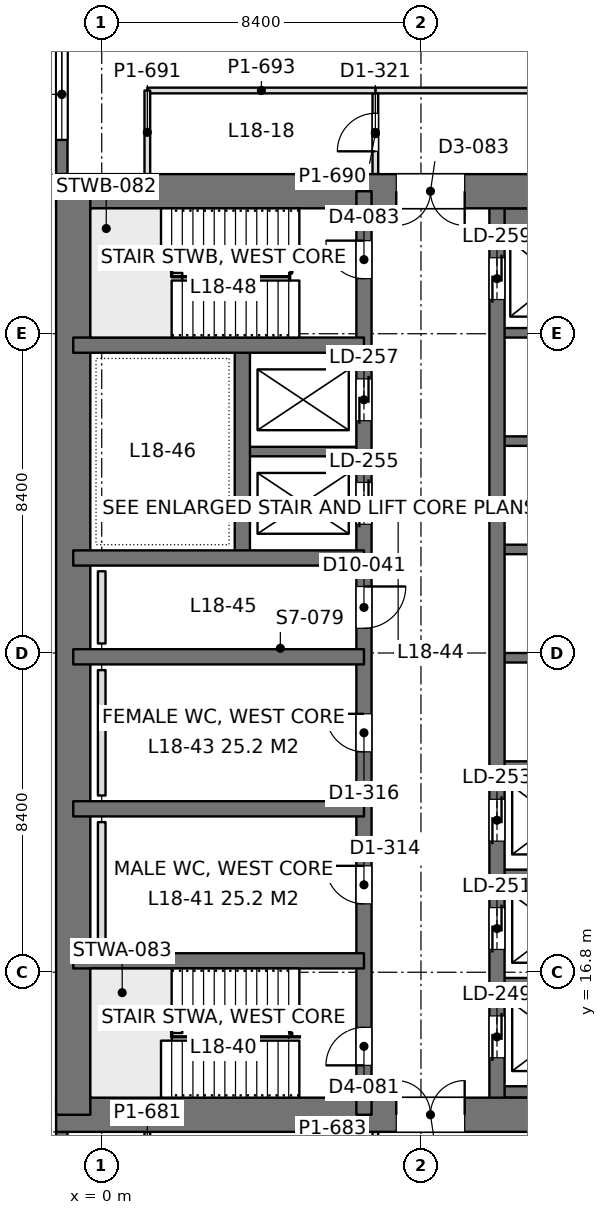
"""IFC4 building model, lengths in metres.
Left out: names, types, materials, properties, quantities, classifications, styles, units other than length and angle.
Written with IfcOpenShell. Run it as: python <this file> out.ifc"""

import sys

from ifc_helpers import new_model, si_unit, direction, frame, frame_2d, origin, place, context, subcontext, project, spatial, rectangle, extrude, element, fill, save


model = new_model("IFC4")
c1 = context("Model", 3, precision=1e-05, world=origin(), true_north=direction((0.0, 1.0)))
c2 = subcontext(c1, "Body", "Model", "MODEL_VIEW")
j1 = project(units=[si_unit("LENGTHUNIT", "METRE"), si_unit("PLANEANGLEUNIT", "RADIAN")], contexts=[c1])
p1 = place(None, origin())
s1 = spatial("IfcSite", under=j1, at=p1, CompositionType="ELEMENT")
p2 = place(p1, origin())
s2 = spatial("IfcBuilding", under=s1, at=p2, CompositionType="ELEMENT")
p3 = place(p2, frame((0.0, 0.0, 81.9)))
s3 = spatial("IfcBuildingStorey", under=s2, at=p3, CompositionType="ELEMENT", Elevation=81.9)
p4 = place(p3, frame((-1.2, 13.05, 0.0), z_axis=(0.0, 0.0, 1.0), x_axis=(1.0, 0.0, 0.0)))
e1 = element("IfcWall", 1, at=p4, inside=s3, PredefinedType="SHEAR", context=c2, shape_type="SweptSolid", body=[
    extrude(rectangle(XDim=18.0, YDim=0.9, at=frame_2d((9.0, 0.0))), origin(), (0.0, 0.0, 1.0), 4.5),
])
p5 = place(p4, frame((8.95, 0.0, 0.0)))
e2 = element("IfcOpeningElement", 2, at=p5, cuts=e1, PredefinedType="OPENING", context=c2, shape_type="SweptSolid", body=[
    extrude(rectangle(XDim=1.8, YDim=2.4, at=frame_2d((0.9, 1.2))), frame((0.0, 0.46, 0.0), z_axis=(0.0, -1.0, 0.0), x_axis=(1.0, 0.0, 0.0)), (0.0, 0.0, 1.0), 0.92),
])
p6 = place(p3, frame((-1.2, 37.35, 0.0), z_axis=(0.0, 0.0, 1.0), x_axis=(1.0, 0.0, 0.0)))
e3 = element("IfcWall", 3, at=p6, inside=s3, PredefinedType="SHEAR", context=c2, shape_type="SweptSolid", body=[
    extrude(rectangle(XDim=18.0, YDim=0.9, at=frame_2d((9.0, 0.0))), origin(), (0.0, 0.0, 1.0), 4.5),
])
p7 = place(p6, frame((8.95, 0.0, 0.0)))
e4 = element("IfcOpeningElement", 4, at=p7, cuts=e3, PredefinedType="OPENING", context=c2, shape_type="SweptSolid", body=[
    extrude(rectangle(XDim=1.8, YDim=2.4, at=frame_2d((0.9, 1.2))), frame((0.0, 0.46, 0.0), z_axis=(0.0, -1.0, 0.0), x_axis=(1.0, 0.0, 0.0)), (0.0, 0.0, 1.0), 0.92),
])
p8 = place(p3, frame((-0.75, 13.05, 0.0), z_axis=(0.0, 0.0, 1.0), x_axis=(0.0, 1.0, 0.0)))
e5 = element("IfcWall", 5, at=p8, inside=s3, PredefinedType="SHEAR", context=c2, shape_type="SweptSolid", body=[
    extrude(rectangle(XDim=24.3, YDim=0.9, at=frame_2d((12.15, 0.0))), origin(), (0.0, 0.0, 1.0), 4.5),
])
p9 = place(p3, frame((6.9, 13.05, 0.0), z_axis=(0.0, 0.0, 1.0), x_axis=(0.0, 1.0, 0.0)))
e6 = element("IfcWall", 6, at=p9, inside=s3, PredefinedType="SHEAR", context=c2, shape_type="SweptSolid", body=[
    extrude(rectangle(XDim=24.3, YDim=0.4, at=frame_2d((12.15, 0.0))), origin(), (0.0, 0.0, 1.0), 4.5),
])
p10 = place(p9, frame((1.3, 0.0, 0.0)))
e7 = element("IfcOpeningElement", 7, at=p10, cuts=e6, PredefinedType="OPENING", context=c2, shape_type="SweptSolid", body=[
    extrude(rectangle(XDim=1.0, YDim=2.2, at=frame_2d((0.5, 1.1))), frame((0.0, 0.21, 0.0), z_axis=(0.0, -1.0, 0.0), x_axis=(1.0, 0.0, 0.0)), (0.0, 0.0, 1.0), 0.42),
])
p11 = place(p9, frame((22.0, 0.0, 0.0)))
e8 = element("IfcOpeningElement", 8, at=p11, cuts=e6, PredefinedType="OPENING", context=c2, shape_type="SweptSolid", body=[
    extrude(rectangle(XDim=1.0, YDim=2.2, at=frame_2d((0.5, 1.1))), frame((0.0, 0.21, 0.0), z_axis=(0.0, -1.0, 0.0), x_axis=(1.0, 0.0, 0.0)), (0.0, 0.0, 1.0), 0.42),
])
p12 = place(p9, frame((5.55, 0.0, 0.0)))
e9 = element("IfcOpeningElement", 9, at=p12, cuts=e6, PredefinedType="OPENING", context=c2, shape_type="SweptSolid", body=[
    extrude(rectangle(XDim=1.0, YDim=2.2, at=frame_2d((0.5, 1.1))), frame((0.0, 0.21, 0.0), z_axis=(0.0, -1.0, 0.0), x_axis=(1.0, 0.0, 0.0)), (0.0, 0.0, 1.0), 0.42),
])
p13 = place(p9, frame((9.55, 0.0, 0.0)))
e10 = element("IfcOpeningElement", 10, at=p13, cuts=e6, PredefinedType="OPENING", context=c2, shape_type="SweptSolid", body=[
    extrude(rectangle(XDim=1.0, YDim=2.2, at=frame_2d((0.5, 1.1))), frame((0.0, 0.21, 0.0), z_axis=(0.0, -1.0, 0.0), x_axis=(1.0, 0.0, 0.0)), (0.0, 0.0, 1.0), 0.42),
])
p14 = place(p9, frame((12.8, 0.0, 0.0)))
e11 = element("IfcOpeningElement", 11, at=p14, cuts=e6, PredefinedType="OPENING", context=c2, shape_type="SweptSolid", body=[
    extrude(rectangle(XDim=1.1, YDim=2.2, at=frame_2d((0.55, 1.1))), frame((0.0, 0.21, 0.0), z_axis=(0.0, -1.0, 0.0), x_axis=(1.0, 0.0, 0.0)), (0.0, 0.0, 1.0), 0.42),
])
p15 = place(p9, frame((15.538, 0.0, 0.0)))
e12 = element("IfcOpeningElement", 12, at=p15, cuts=e6, PredefinedType="OPENING", context=c2, shape_type="SweptSolid", body=[
    extrude(rectangle(XDim=1.1, YDim=2.2, at=frame_2d((0.55, 1.1))), frame((0.0, 0.21, 0.0), z_axis=(0.0, -1.0, 0.0), x_axis=(1.0, 0.0, 0.0)), (0.0, 0.0, 1.0), 0.42),
])
p16 = place(p9, frame((18.262, 0.0, 0.0)))
e13 = element("IfcOpeningElement", 13, at=p16, cuts=e6, PredefinedType="OPENING", context=c2, shape_type="SweptSolid", body=[
    extrude(rectangle(XDim=1.1, YDim=2.2, at=frame_2d((0.55, 1.1))), frame((0.0, 0.21, 0.0), z_axis=(0.0, -1.0, 0.0), x_axis=(1.0, 0.0, 0.0)), (0.0, 0.0, 1.0), 0.42),
])
p17 = place(p3, frame((10.4, 13.05, 0.0), z_axis=(0.0, 0.0, 1.0), x_axis=(0.0, 1.0, 0.0)))
e14 = element("IfcWall", 14, at=p17, inside=s3, PredefinedType="SHEAR", context=c2, shape_type="SweptSolid", body=[
    extrude(rectangle(XDim=24.3, YDim=0.4, at=frame_2d((12.15, 0.0))), origin(), (0.0, 0.0, 1.0), 4.5),
])
p18 = place(p17, frame((1.5, 0.0, 0.0)))
e15 = element("IfcOpeningElement", 15, at=p18, cuts=e14, PredefinedType="OPENING", context=c2, shape_type="SweptSolid", body=[
    extrude(rectangle(XDim=1.1, YDim=2.2, at=frame_2d((0.55, 1.1))), frame((0.0, 0.21, 0.0), z_axis=(0.0, -1.0, 0.0), x_axis=(1.0, 0.0, 0.0)), (0.0, 0.0, 1.0), 0.42),
])
p19 = place(p17, frame((4.35, 0.0, 0.0)))
e16 = element("IfcOpeningElement", 16, at=p19, cuts=e14, PredefinedType="OPENING", context=c2, shape_type="SweptSolid", body=[
    extrude(rectangle(XDim=1.1, YDim=2.2, at=frame_2d((0.55, 1.1))), frame((0.0, 0.21, 0.0), z_axis=(0.0, -1.0, 0.0), x_axis=(1.0, 0.0, 0.0)), (0.0, 0.0, 1.0), 0.42),
])
p20 = place(p17, frame((7.2, 0.0, 0.0)))
e17 = element("IfcOpeningElement", 17, at=p20, cuts=e14, PredefinedType="OPENING", context=c2, shape_type="SweptSolid", body=[
    extrude(rectangle(XDim=1.1, YDim=2.2, at=frame_2d((0.55, 1.1))), frame((0.0, 0.21, 0.0), z_axis=(0.0, -1.0, 0.0), x_axis=(1.0, 0.0, 0.0)), (0.0, 0.0, 1.0), 0.42),
])
p21 = place(p17, frame((21.45, 0.0, 0.0)))
e18 = element("IfcOpeningElement", 18, at=p21, cuts=e14, PredefinedType="OPENING", context=c2, shape_type="SweptSolid", body=[
    extrude(rectangle(XDim=1.1, YDim=2.2, at=frame_2d((0.55, 1.1))), frame((0.0, 0.21, 0.0), z_axis=(0.0, -1.0, 0.0), x_axis=(1.0, 0.0, 0.0)), (0.0, 0.0, 1.0), 0.42),
])
for number, where, z_axis, x_axis in (
    (19, (-0.75, 17.1, 0.0), (0.0, 0.0, 1.0), (1.0, 0.0, 0.0)),
    (20, (-0.75, 21.1, 0.0), (0.0, 0.0, 1.0), (1.0, 0.0, 0.0)),
    (21, (-0.75, 25.1, 0.0), (0.0, 0.0, 1.0), (1.0, 0.0, 0.0)),
    (22, (-0.75, 27.7, 0.0), (0.0, 0.0, 1.0), (1.0, 0.0, 0.0)),
    (23, (-0.75, 33.3, 0.0), (0.0, 0.0, 1.0), (1.0, 0.0, 0.0)),
):
    element("IfcWall", number, at=place(p3, frame(where, z_axis=z_axis, x_axis=x_axis)), inside=s3, PredefinedType="SHEAR", context=c2, shape_type="SweptSolid", body=[
        extrude(rectangle(XDim=7.65, YDim=0.4, at=frame_2d((3.825, 0.0))), origin(), (0.0, 0.0, 1.0), 4.5),
    ])
p22 = place(p3, frame((3.7, 27.7, 0.0), z_axis=(0.0, 0.0, 1.0), x_axis=(0.0, 1.0, 0.0)))
e24 = element("IfcWall", 24, at=p22, inside=s3, PredefinedType="SHEAR", context=c2, shape_type="SweptSolid", body=[
    extrude(rectangle(XDim=5.6, YDim=0.4, at=frame_2d((2.8, 0.0))), origin(), (0.0, 0.0, 1.0), 4.5),
])
p23 = place(p3, frame((3.7, 30.5, 0.0), z_axis=(0.0, 0.0, 1.0), x_axis=(1.0, 0.0, 0.0)))
e25 = element("IfcWall", 25, at=p23, inside=s3, PredefinedType="SHEAR", context=c2, shape_type="SweptSolid", body=[
    extrude(rectangle(XDim=3.2, YDim=0.25, at=frame_2d((1.6, 0.0))), origin(), (0.0, 0.0, 1.0), 4.5),
])
p24 = place(p3, frame((10.4, 13.65, 0.0), z_axis=(0.0, 0.0, 1.0), x_axis=(1.0, 0.0, 0.0)))
e26 = element("IfcWall", 26, at=p24, inside=s3, PredefinedType="SHEAR", context=c2, shape_type="SweptSolid", body=[
    extrude(rectangle(XDim=3.2, YDim=0.3, at=frame_2d((1.6, 0.0))), origin(), (0.0, 0.0, 1.0), 4.5),
])
for number, where, z_axis, x_axis in (
    (27, (10.4, 16.525, 0.0), (0.0, 0.0, 1.0), (1.0, 0.0, 0.0)),
    (28, (10.4, 19.375, 0.0), (0.0, 0.0, 1.0), (1.0, 0.0, 0.0)),
    (29, (10.4, 22.225, 0.0), (0.0, 0.0, 1.0), (1.0, 0.0, 0.0)),
    (30, (10.4, 25.075, 0.0), (0.0, 0.0, 1.0), (1.0, 0.0, 0.0)),
    (31, (10.4, 27.925, 0.0), (0.0, 0.0, 1.0), (1.0, 0.0, 0.0)),
    (32, (10.4, 30.775, 0.0), (0.0, 0.0, 1.0), (1.0, 0.0, 0.0)),
    (33, (10.4, 33.625, 0.0), (0.0, 0.0, 1.0), (1.0, 0.0, 0.0)),
):
    element("IfcWall", number, at=place(p3, frame(where, z_axis=z_axis, x_axis=x_axis)), inside=s3, PredefinedType="SHEAR", context=c2, shape_type="SweptSolid", body=[
        extrude(rectangle(XDim=3.2, YDim=0.25, at=frame_2d((1.6, 0.0))), origin(), (0.0, 0.0, 1.0), 4.5),
    ])
p25 = place(p3, frame((10.4, 36.625, 0.0), z_axis=(0.0, 0.0, 1.0), x_axis=(1.0, 0.0, 0.0)))
e34 = element("IfcWall", 34, at=p25, inside=s3, PredefinedType="SHEAR", context=c2, shape_type="SweptSolid", body=[
    extrude(rectangle(XDim=3.2, YDim=0.55, at=frame_2d((1.6, 0.0))), origin(), (0.0, 0.0, 1.0), 4.5),
])
p26 = place(p3, frame((-1.05, 8.4, 0.0), z_axis=(0.0, 0.0, 1.0), x_axis=(0.0, 1.0, 0.0)))
e35 = element("IfcWall", 35, at=p26, inside=s3, PredefinedType="SOLIDWALL", context=c2, shape_type="SweptSolid", body=[
    extrude(rectangle(XDim=4.2, YDim=0.3, at=frame_2d((2.1, 0.0))), origin(), (0.0, 0.0, 1.0), 4.34),
])
p27 = place(p26, frame((0.9, 0.0, 0.9)))
e36 = element("IfcOpeningElement", 36, at=p27, cuts=e35, PredefinedType="OPENING", context=c2, shape_type="SweptSolid", body=[
    extrude(rectangle(XDim=2.4, YDim=1.9, at=frame_2d((1.2, 0.95))), frame((0.0, 0.16, 0.0), z_axis=(0.0, -1.0, 0.0), x_axis=(1.0, 0.0, 0.0)), (0.0, 0.0, 1.0), 0.32),
])
p28 = place(p3, frame((-1.05, 37.8, 0.0), z_axis=(0.0, 0.0, 1.0), x_axis=(0.0, 1.0, 0.0)))
e37 = element("IfcWall", 37, at=p28, inside=s3, PredefinedType="SOLIDWALL", context=c2, shape_type="SweptSolid", body=[
    extrude(rectangle(XDim=4.2, YDim=0.3, at=frame_2d((2.1, 0.0))), origin(), (0.0, 0.0, 1.0), 4.34),
])
p29 = place(p28, frame((0.9, 0.0, 0.9)))
e38 = element("IfcOpeningElement", 38, at=p29, cuts=e37, PredefinedType="OPENING", context=c2, shape_type="SweptSolid", body=[
    extrude(rectangle(XDim=2.4, YDim=1.9, at=frame_2d((1.2, 0.95))), frame((0.0, 0.16, 0.0), z_axis=(0.0, -1.0, 0.0), x_axis=(1.0, 0.0, 0.0)), (0.0, 0.0, 1.0), 0.32),
])
p30 = place(p3, frame((7.2, 10.474, 0.0), z_axis=(0.0, 0.0, 1.0), x_axis=(0.0, 1.0, 0.0)))
e39 = element("IfcWall", 39, at=p30, inside=s3, PredefinedType="PARTITIONING", context=c2, shape_type="SweptSolid", body=[
    extrude(rectangle(XDim=2.128, YDim=0.15, at=frame_2d((1.064, 0.0))), origin(), (0.0, 0.0, 1.0), 4.34),
])
p31 = place(p30, frame((0.526, 0.0, 0.0)))
e40 = element("IfcOpeningElement", 40, at=p31, cuts=e39, PredefinedType="OPENING", context=c2, shape_type="SweptSolid", body=[
    extrude(rectangle(XDim=1.0, YDim=2.2, at=frame_2d((0.5, 1.1))), frame((0.0, 0.085, 0.0), z_axis=(0.0, -1.0, 0.0), x_axis=(1.0, 0.0, 0.0)), (0.0, 0.0, 1.0), 0.17),
])
p32 = place(p3, frame((1.2, 10.4, 0.0), z_axis=(0.0, 0.0, 1.0), x_axis=(0.0, 1.0, 0.0)))
e41 = element("IfcWall", 41, at=p32, inside=s3, PredefinedType="PARTITIONING", context=c2, shape_type="SweptSolid", body=[
    extrude(rectangle(XDim=2.202, YDim=0.15, at=frame_2d((1.101, 0.0))), origin(), (0.0, 0.0, 1.0), 4.34),
])
p33 = place(p3, frame((7.198, 40.0, 0.0), z_axis=(0.0, 0.0, 1.0), x_axis=(1.0, 0.0, 0.0)))
e42 = element("IfcWall", 42, at=p33, inside=s3, PredefinedType="PARTITIONING", context=c2, shape_type="SweptSolid", body=[
    extrude(rectangle(XDim=42.002, YDim=0.15, at=frame_2d((21.001, 0.0))), origin(), (0.0, 0.0, 1.0), 3.74),
])
p34 = place(p33, frame((4.502, 0.0, 0.0)))
e43 = element("IfcOpeningElement", 43, at=p34, cuts=e42, PredefinedType="OPENING", context=c2, shape_type="SweptSolid", body=[
    extrude(rectangle(XDim=1.8, YDim=2.2, at=frame_2d((0.9, 1.1))), frame((0.0, 0.085, 0.0), z_axis=(0.0, -1.0, 0.0), x_axis=(1.0, 0.0, 0.0)), (0.0, 0.0, 1.0), 0.17),
])
p35 = place(p33, frame((12.902, 0.0, 0.0)))
e44 = element("IfcOpeningElement", 44, at=p35, cuts=e42, PredefinedType="OPENING", context=c2, shape_type="SweptSolid", body=[
    extrude(rectangle(XDim=1.8, YDim=2.2, at=frame_2d((0.9, 1.1))), frame((0.0, 0.085, 0.0), z_axis=(0.0, -1.0, 0.0), x_axis=(1.0, 0.0, 0.0)), (0.0, 0.0, 1.0), 0.17),
])
p36 = place(p33, frame((21.302, 0.0, 0.0)))
e45 = element("IfcOpeningElement", 45, at=p36, cuts=e42, PredefinedType="OPENING", context=c2, shape_type="SweptSolid", body=[
    extrude(rectangle(XDim=1.8, YDim=2.2, at=frame_2d((0.9, 1.1))), frame((0.0, 0.085, 0.0), z_axis=(0.0, -1.0, 0.0), x_axis=(1.0, 0.0, 0.0)), (0.0, 0.0, 1.0), 0.17),
])
p37 = place(p33, frame((29.702, 0.0, 0.0)))
e46 = element("IfcOpeningElement", 46, at=p37, cuts=e42, PredefinedType="OPENING", context=c2, shape_type="SweptSolid", body=[
    extrude(rectangle(XDim=1.8, YDim=2.2, at=frame_2d((0.9, 1.1))), frame((0.0, 0.085, 0.0), z_axis=(0.0, -1.0, 0.0), x_axis=(1.0, 0.0, 0.0)), (0.0, 0.0, 1.0), 0.17),
])
p38 = place(p33, frame((38.102, 0.0, 0.0)))
e47 = element("IfcOpeningElement", 47, at=p38, cuts=e42, PredefinedType="OPENING", context=c2, shape_type="SweptSolid", body=[
    extrude(rectangle(XDim=1.8, YDim=2.2, at=frame_2d((0.9, 1.1))), frame((0.0, 0.085, 0.0), z_axis=(0.0, -1.0, 0.0), x_axis=(1.0, 0.0, 0.0)), (0.0, 0.0, 1.0), 0.17),
])
p39 = place(p3, frame((7.2, 37.8, 0.0), z_axis=(0.0, 0.0, 1.0), x_axis=(0.0, 1.0, 0.0)))
e48 = element("IfcWall", 48, at=p39, inside=s3, PredefinedType="PARTITIONING", context=c2, shape_type="SweptSolid", body=[
    extrude(rectangle(XDim=2.126, YDim=0.15, at=frame_2d((1.063, 0.0))), origin(), (0.0, 0.0, 1.0), 4.34),
])
p40 = place(p39, frame((0.6, 0.0, 0.0)))
e49 = element("IfcOpeningElement", 49, at=p40, cuts=e48, PredefinedType="OPENING", context=c2, shape_type="SweptSolid", body=[
    extrude(rectangle(XDim=1.0, YDim=2.2, at=frame_2d((0.5, 1.1))), frame((0.0, 0.085, 0.0), z_axis=(0.0, -1.0, 0.0), x_axis=(1.0, 0.0, 0.0)), (0.0, 0.0, 1.0), 0.17),
])
p41 = place(p3, frame((1.2, 40.0, 0.0), z_axis=(0.0, 0.0, 1.0), x_axis=(1.0, 0.0, 0.0)))
e50 = element("IfcWall", 50, at=p41, inside=s3, PredefinedType="PARTITIONING", context=c2, shape_type="SweptSolid", body=[
    extrude(rectangle(XDim=6.002, YDim=0.15, at=frame_2d((3.001, 0.0))), origin(), (0.0, 0.0, 1.0), 3.98),
])
p42 = place(p3, frame((1.2, 37.8, 0.0), z_axis=(0.0, 0.0, 1.0), x_axis=(0.0, 1.0, 0.0)))
e51 = element("IfcWall", 51, at=p42, inside=s3, PredefinedType="PARTITIONING", context=c2, shape_type="SweptSolid", body=[
    extrude(rectangle(XDim=2.2, YDim=0.15, at=frame_2d((1.1, 0.0))), origin(), (0.0, 0.0, 1.0), 4.34),
])
for number, where, z_axis, x_axis in (
    (52, (0.0, 17.45, 0.0), (0.0, 0.0, 1.0), (0.0, 1.0, 0.0)),
    (53, (0.0, 21.45, 0.0), (0.0, 0.0, 1.0), (0.0, 1.0, 0.0)),
):
    element("IfcWall", number, at=place(p3, frame(where, z_axis=z_axis, x_axis=x_axis)), inside=s3, PredefinedType="PLUMBINGWALL", context=c2, shape_type="SweptSolid", body=[
        extrude(rectangle(XDim=3.3, YDim=0.2, at=frame_2d((1.65, 0.0))), origin(), (0.0, 0.0, 1.0), 1.2),
    ])
p43 = place(p3, frame((0.0, 25.45, 0.0), z_axis=(0.0, 0.0, 1.0), x_axis=(0.0, 1.0, 0.0)))
e54 = element("IfcWall", 54, at=p43, inside=s3, PredefinedType="PLUMBINGWALL", context=c2, shape_type="SweptSolid", body=[
    extrude(rectangle(XDim=1.9, YDim=0.2, at=frame_2d((0.95, 0.0))), origin(), (0.0, 0.0, 1.0), 1.2),
])
p44 = place(p29, origin())
e55 = element("IfcWindow", 55, at=p44, inside=s3, PartitioningType="SINGLE_PANEL", PredefinedType="WINDOW", context=c2, shape_type="SweptSolid", body=[
    extrude(rectangle(XDim=2.4, YDim=1.9, at=frame_2d((1.2, 0.95))), frame((0.0, 0.03, 0.0), z_axis=(0.0, -1.0, 0.0), x_axis=(1.0, 0.0, 0.0)), (0.0, 0.0, 1.0), 0.06),
])
fill(e38, e55)
p45 = place(p5, origin())
e56 = element("IfcDoor", 56, at=p45, inside=s3, OperationType="DOUBLE_DOOR_SINGLE_SWING", PredefinedType="DOOR", context=c2, shape_type="SweptSolid", body=[
    extrude(rectangle(XDim=1.8, YDim=2.4, at=frame_2d((0.9, 1.2))), frame((0.0, 0.025, 0.0), z_axis=(0.0, -1.0, 0.0), x_axis=(1.0, 0.0, 0.0)), (0.0, 0.0, 1.0), 0.05),
])
fill(e2, e56)
p46 = place(p7, frame((1.8, 0.0, 0.0), z_axis=(0.0, 0.0, 1.0), x_axis=(-1.0, 0.0, 0.0)))
e57 = element("IfcDoor", 57, at=p46, inside=s3, OperationType="DOUBLE_DOOR_SINGLE_SWING", PredefinedType="DOOR", context=c2, shape_type="SweptSolid", body=[
    extrude(rectangle(XDim=1.8, YDim=2.4, at=frame_2d((0.9, 1.2))), frame((0.0, 0.025, 0.0), z_axis=(0.0, -1.0, 0.0), x_axis=(1.0, 0.0, 0.0)), (0.0, 0.0, 1.0), 0.05),
])
fill(e4, e57)
p47 = place(p10, origin())
e58 = element("IfcDoor", 58, at=p47, inside=s3, OperationType="SINGLE_SWING_LEFT", PredefinedType="DOOR", context=c2, shape_type="SweptSolid", body=[
    extrude(rectangle(XDim=1.0, YDim=2.2, at=frame_2d((0.5, 1.1))), frame((0.0, 0.025, 0.0), z_axis=(0.0, -1.0, 0.0), x_axis=(1.0, 0.0, 0.0)), (0.0, 0.0, 1.0), 0.05),
])
fill(e7, e58)
p48 = place(p11, origin())
e59 = element("IfcDoor", 59, at=p48, inside=s3, OperationType="SINGLE_SWING_RIGHT", PredefinedType="DOOR", context=c2, shape_type="SweptSolid", body=[
    extrude(rectangle(XDim=1.0, YDim=2.2, at=frame_2d((0.5, 1.1))), frame((0.0, 0.025, 0.0), z_axis=(0.0, -1.0, 0.0), x_axis=(1.0, 0.0, 0.0)), (0.0, 0.0, 1.0), 0.05),
])
fill(e8, e59)
p49 = place(p12, origin())
e60 = element("IfcDoor", 60, at=p49, inside=s3, OperationType="SINGLE_SWING_RIGHT", PredefinedType="DOOR", context=c2, shape_type="SweptSolid", body=[
    extrude(rectangle(XDim=1.0, YDim=2.2, at=frame_2d((0.5, 1.1))), frame((0.0, 0.025, 0.0), z_axis=(0.0, -1.0, 0.0), x_axis=(1.0, 0.0, 0.0)), (0.0, 0.0, 1.0), 0.05),
])
fill(e9, e60)
p50 = place(p13, origin())
e61 = element("IfcDoor", 61, at=p50, inside=s3, OperationType="SINGLE_SWING_RIGHT", PredefinedType="DOOR", context=c2, shape_type="SweptSolid", body=[
    extrude(rectangle(XDim=1.0, YDim=2.2, at=frame_2d((0.5, 1.1))), frame((0.0, 0.025, 0.0), z_axis=(0.0, -1.0, 0.0), x_axis=(1.0, 0.0, 0.0)), (0.0, 0.0, 1.0), 0.05),
])
fill(e10, e61)
p51 = place(p14, frame((1.1, 0.0, 0.0), z_axis=(0.0, 0.0, 1.0), x_axis=(-1.0, 0.0, 0.0)))
e62 = element("IfcDoor", 62, at=p51, inside=s3, OperationType="SINGLE_SWING_LEFT", PredefinedType="DOOR", context=c2, shape_type="SweptSolid", body=[
    extrude(rectangle(XDim=1.1, YDim=2.2, at=frame_2d((0.55, 1.1))), frame((0.0, 0.025, 0.0), z_axis=(0.0, -1.0, 0.0), x_axis=(1.0, 0.0, 0.0)), (0.0, 0.0, 1.0), 0.05),
])
fill(e11, e62)
p52 = place(p18, origin())
e63 = element("IfcDoor", 63, at=p52, inside=s3, OperationType="DOUBLE_DOOR_SLIDING", PredefinedType="DOOR", context=c2, shape_type="SweptSolid", body=[
    extrude(rectangle(XDim=1.1, YDim=2.2, at=frame_2d((0.55, 1.1))), frame((0.0, 0.025, 0.0), z_axis=(0.0, -1.0, 0.0), x_axis=(1.0, 0.0, 0.0)), (0.0, 0.0, 1.0), 0.05),
])
fill(e15, e63)
p53 = place(p19, origin())
e64 = element("IfcDoor", 64, at=p53, inside=s3, OperationType="DOUBLE_DOOR_SLIDING", PredefinedType="DOOR", context=c2, shape_type="SweptSolid", body=[
    extrude(rectangle(XDim=1.1, YDim=2.2, at=frame_2d((0.55, 1.1))), frame((0.0, 0.025, 0.0), z_axis=(0.0, -1.0, 0.0), x_axis=(1.0, 0.0, 0.0)), (0.0, 0.0, 1.0), 0.05),
])
fill(e16, e64)
p54 = place(p20, origin())
e65 = element("IfcDoor", 65, at=p54, inside=s3, OperationType="DOUBLE_DOOR_SLIDING", PredefinedType="DOOR", context=c2, shape_type="SweptSolid", body=[
    extrude(rectangle(XDim=1.1, YDim=2.2, at=frame_2d((0.55, 1.1))), frame((0.0, 0.025, 0.0), z_axis=(0.0, -1.0, 0.0), x_axis=(1.0, 0.0, 0.0)), (0.0, 0.0, 1.0), 0.05),
])
fill(e17, e65)
p55 = place(p21, origin())
e66 = element("IfcDoor", 66, at=p55, inside=s3, OperationType="DOUBLE_DOOR_SLIDING", PredefinedType="DOOR", context=c2, shape_type="SweptSolid", body=[
    extrude(rectangle(XDim=1.1, YDim=2.2, at=frame_2d((0.55, 1.1))), frame((0.0, 0.025, 0.0), z_axis=(0.0, -1.0, 0.0), x_axis=(1.0, 0.0, 0.0)), (0.0, 0.0, 1.0), 0.05),
])
fill(e18, e66)
p56 = place(p15, origin())
e67 = element("IfcDoor", 67, at=p56, inside=s3, OperationType="DOUBLE_DOOR_SLIDING", PredefinedType="DOOR", context=c2, shape_type="SweptSolid", body=[
    extrude(rectangle(XDim=1.1, YDim=2.2, at=frame_2d((0.55, 1.1))), frame((0.0, 0.025, 0.0), z_axis=(0.0, -1.0, 0.0), x_axis=(1.0, 0.0, 0.0)), (0.0, 0.0, 1.0), 0.05),
])
fill(e12, e67)
p57 = place(p16, origin())
e68 = element("IfcDoor", 68, at=p57, inside=s3, OperationType="DOUBLE_DOOR_SLIDING", PredefinedType="DOOR", context=c2, shape_type="SweptSolid", body=[
    extrude(rectangle(XDim=1.1, YDim=2.2, at=frame_2d((0.55, 1.1))), frame((0.0, 0.025, 0.0), z_axis=(0.0, -1.0, 0.0), x_axis=(1.0, 0.0, 0.0)), (0.0, 0.0, 1.0), 0.05),
])
fill(e13, e68)
p58 = place(p40, origin())
e69 = element("IfcDoor", 69, at=p58, inside=s3, OperationType="SINGLE_SWING_LEFT", PredefinedType="DOOR", context=c2, shape_type="SweptSolid", body=[
    extrude(rectangle(XDim=1.0, YDim=2.2, at=frame_2d((0.5, 1.1))), frame((0.0, 0.025, 0.0), z_axis=(0.0, -1.0, 0.0), x_axis=(1.0, 0.0, 0.0)), (0.0, 0.0, 1.0), 0.05),
])
fill(e49, e69)
save(model, sys.argv[1])
